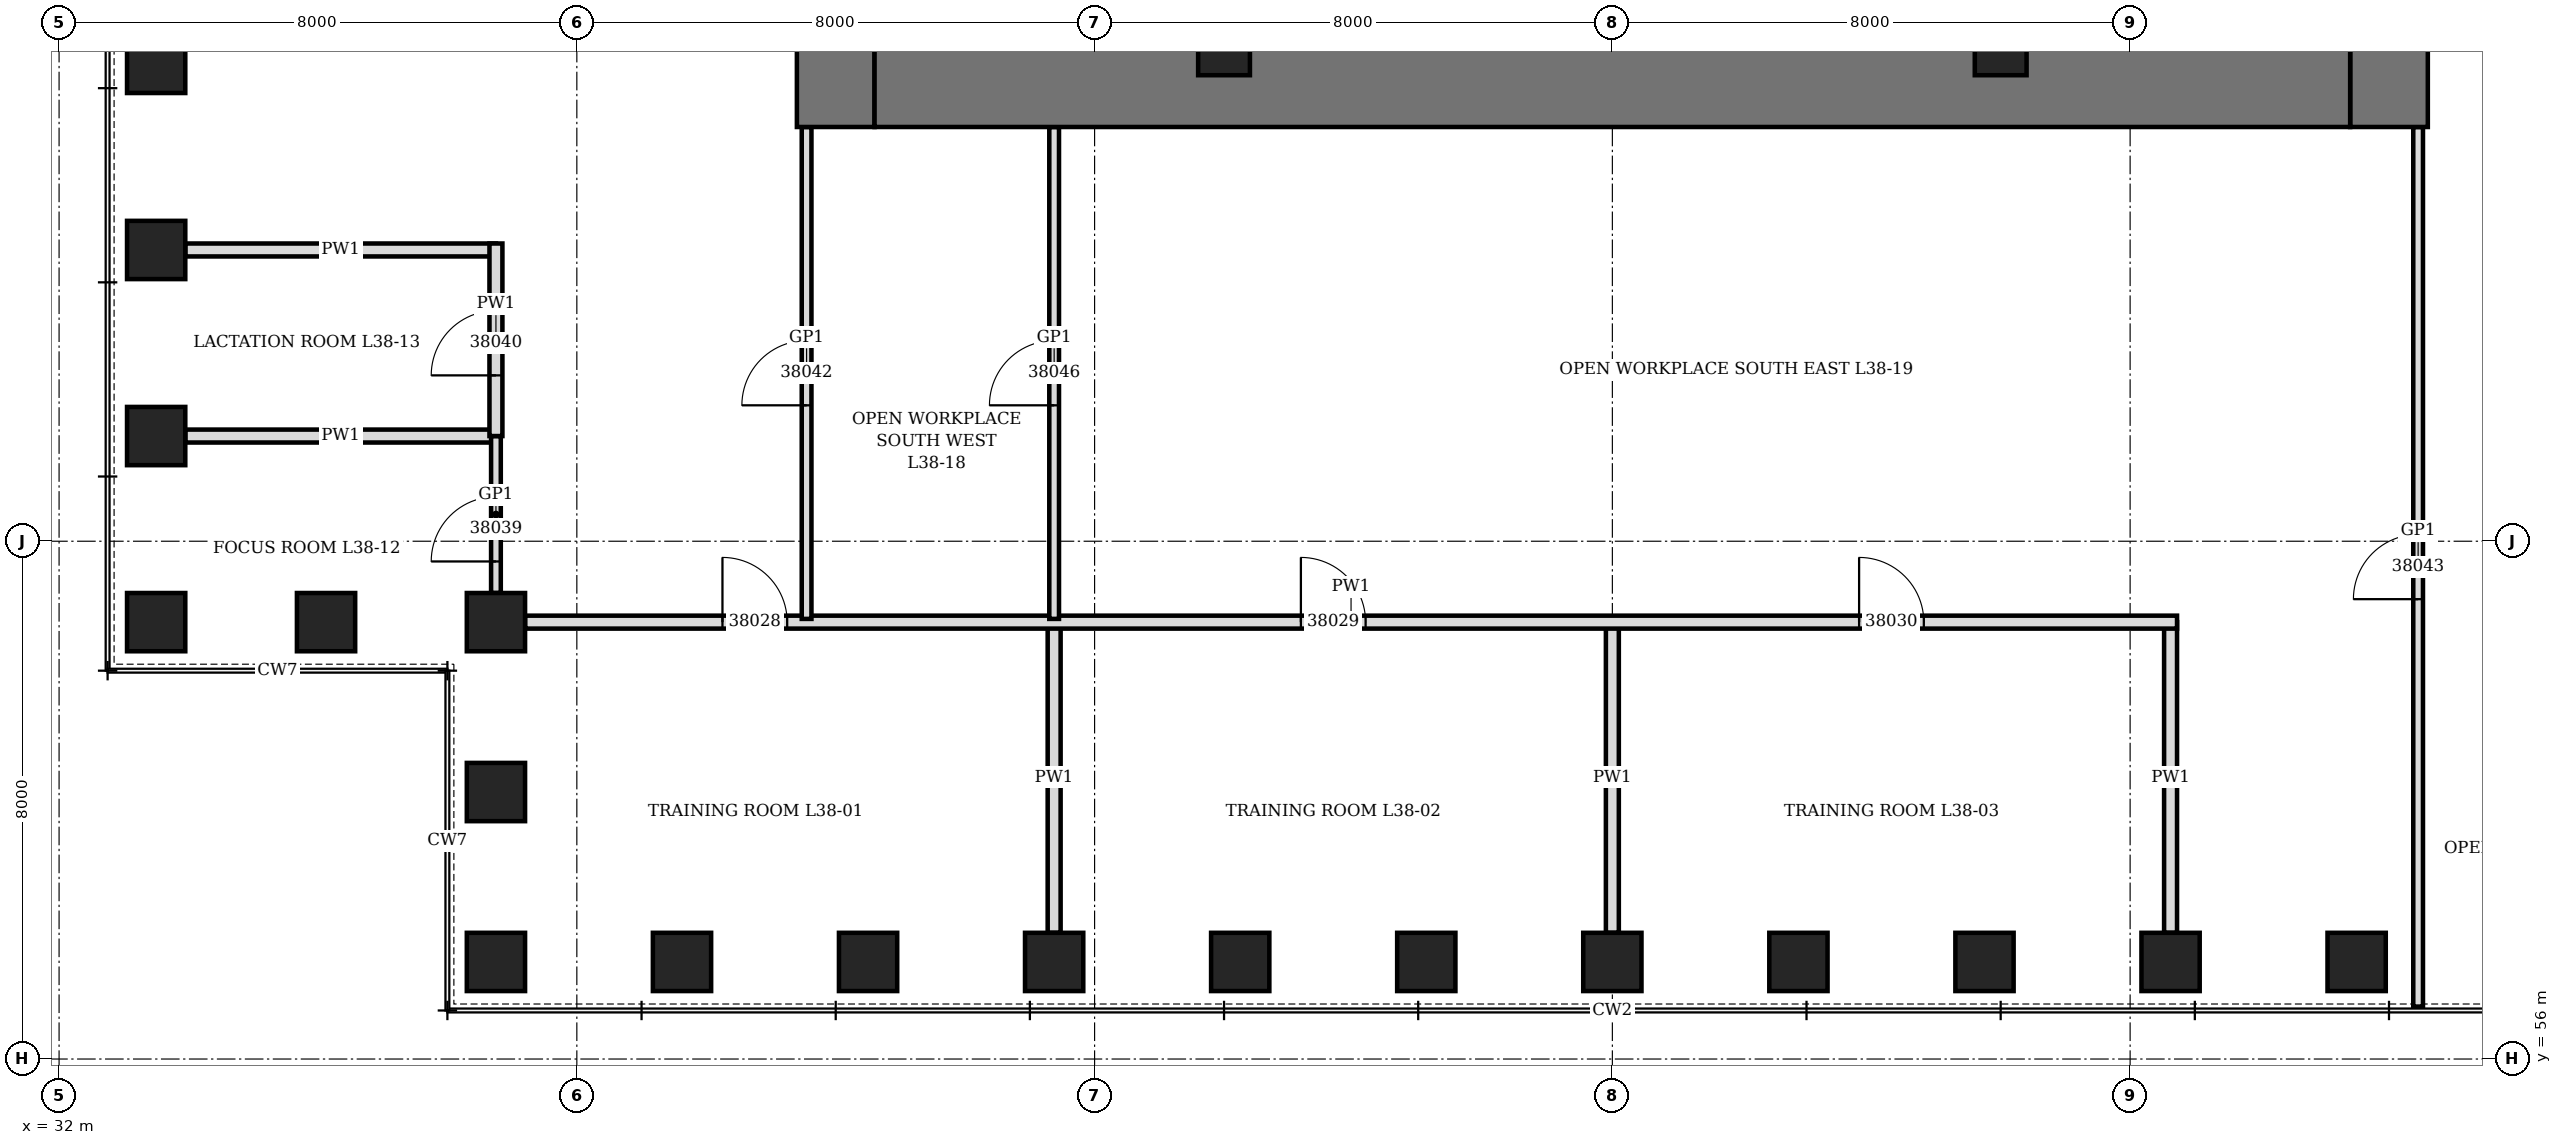
"""IFC4 building model, lengths in metres.
Left out: names, types, materials, properties, quantities, classifications, styles, units other than length and angle.
Written with IfcOpenShell. Run it as: python <this file> out.ifc"""

import sys

from ifc_helpers import new_model, si_unit, direction, frame, frame_2d, origin, origin_2d, place, context, subcontext, project, spatial, rectangle, hollow_rectangle, extrude, element, fill, save


model = new_model("IFC4")
c1 = context("Model", 3, precision=1e-05, world=origin(), true_north=direction((0.0, 1.0)))
c2 = subcontext(c1, "Body", "Model", "MODEL_VIEW")
j1 = project(units=[si_unit("LENGTHUNIT", "METRE"), si_unit("PLANEANGLEUNIT", "RADIAN")], contexts=[c1])
p1 = place(None, origin())
s1 = spatial("IfcSite", under=j1, at=p1, CompositionType="ELEMENT")
p2 = place(p1, origin())
s2 = spatial("IfcBuilding", under=s1, at=p2, CompositionType="ELEMENT")
p3 = place(p2, frame((0.0, 0.0, 171.1)))
s3 = spatial("IfcBuildingStorey", under=s2, at=p3, CompositionType="ELEMENT", Elevation=171.1)
for number, where, z_axis, x_axis in (
    (1, (38.75, 57.5, 0.0), (0.0, 0.0, 1.0), (1.0, 0.0, 0.0)),
    (2, (41.625, 57.5, 0.0), (0.0, 0.0, 1.0), (1.0, 0.0, 0.0)),
    (3, (44.5, 57.5, 0.0), (0.0, 0.0, 1.0), (1.0, 0.0, 0.0)),
    (4, (47.375, 57.5, 0.0), (0.0, 0.0, 1.0), (1.0, 0.0, 0.0)),
    (5, (50.25, 57.5, 0.0), (0.0, 0.0, 1.0), (1.0, 0.0, 0.0)),
    (6, (53.125, 57.5, 0.0), (0.0, 0.0, 1.0), (1.0, 0.0, 0.0)),
    (7, (56.0, 57.5, 0.0), (0.0, 0.0, 1.0), (1.0, 0.0, 0.0)),
    (8, (58.875, 57.5, 0.0), (0.0, 0.0, 1.0), (1.0, 0.0, 0.0)),
    (9, (61.75, 57.5, 0.0), (0.0, 0.0, 1.0), (1.0, 0.0, 0.0)),
    (10, (64.625, 57.5, 0.0), (0.0, 0.0, 1.0), (1.0, 0.0, 0.0)),
    (11, (67.5, 57.5, 0.0), (0.0, 0.0, 1.0), (1.0, 0.0, 0.0)),
    (12, (33.5, 71.375, 0.0), (0.0, 0.0, 1.0), (0.0, 1.0, 0.0)),
    (13, (33.5, 68.5, 0.0), (0.0, 0.0, 1.0), (0.0, 1.0, 0.0)),
    (14, (33.5, 65.625, 0.0), (0.0, 0.0, 1.0), (0.0, 1.0, 0.0)),
    (15, (33.5, 62.75, 0.0), (0.0, 0.0, 1.0), (1.0, 0.0, 0.0)),
    (16, (36.125, 62.75, 0.0), (0.0, 0.0, 1.0), (1.0, 0.0, 0.0)),
    (17, (38.75, 62.75, 0.0), (0.0, 0.0, 1.0), (0.0, 1.0, 0.0)),
    (18, (38.75, 60.125, 0.0), (0.0, 0.0, 1.0), (0.0, 1.0, 0.0)),
):
    element("IfcColumn", number, at=place(p3, frame(where, z_axis=z_axis, x_axis=x_axis)), inside=s3, PredefinedType="COLUMN", context=c2, shape_type="SweptSolid", body=[
        extrude(hollow_rectangle(XDim=0.9, YDim=0.9, WallThickness=0.12, at=origin_2d()), origin(), (0.0, 0.0, 1.0), 4.2),
    ])
p4 = place(p3, frame((44.0, 70.4, 0.0), z_axis=(0.0, 0.0, 1.0), x_axis=(0.0, 1.0, 0.0)))
e19 = element("IfcWall", 19, at=p4, inside=s3, PredefinedType="SHEAR", context=c2, shape_type="SweptSolid", body=[
    extrude(rectangle(XDim=19.2, YDim=1.2, at=frame_2d((9.6, 0.0))), origin(), (0.0, 0.0, 1.0), 4.2),
])
p5 = place(p4, frame((8.6, 0.0, 0.0)))
e20 = element("IfcOpeningElement", 20, at=p5, cuts=e19, PredefinedType="OPENING", context=c2, shape_type="SweptSolid", body=[
    extrude(rectangle(XDim=2.0, YDim=2.4, at=frame_2d((1.0, 1.2))), frame((0.0, 0.61, 0.0), z_axis=(0.0, -1.0, 0.0), x_axis=(1.0, 0.0, 0.0)), (0.0, 0.0, 1.0), 1.22),
])
p6 = place(p3, frame((68.0, 70.4, 0.0), z_axis=(0.0, 0.0, 1.0), x_axis=(0.0, 1.0, 0.0)))
e21 = element("IfcWall", 21, at=p6, inside=s3, PredefinedType="SHEAR", context=c2, shape_type="SweptSolid", body=[
    extrude(rectangle(XDim=19.2, YDim=1.2, at=frame_2d((9.6, 0.0))), origin(), (0.0, 0.0, 1.0), 4.2),
])
p7 = place(p6, frame((8.6, 0.0, 0.0)))
e22 = element("IfcOpeningElement", 22, at=p7, cuts=e21, PredefinedType="OPENING", context=c2, shape_type="SweptSolid", body=[
    extrude(rectangle(XDim=2.0, YDim=2.4, at=frame_2d((1.0, 1.2))), frame((0.0, 0.61, 0.0), z_axis=(0.0, -1.0, 0.0), x_axis=(1.0, 0.0, 0.0)), (0.0, 0.0, 1.0), 1.22),
])
p8 = place(p3, frame((44.6, 71.0, 0.0), z_axis=(0.0, 0.0, 1.0), x_axis=(1.0, 0.0, 0.0)))
e23 = element("IfcWall", 23, at=p8, inside=s3, PredefinedType="SHEAR", context=c2, shape_type="SweptSolid", body=[
    extrude(rectangle(XDim=22.8, YDim=1.2, at=frame_2d((11.4, 0.0))), origin(), (0.0, 0.0, 1.0), 4.2),
])
for number, where, z_axis, x_axis in (
    (24, (50.0, 71.6, 0.0), (0.0, 0.0, 1.0), (1.0, 0.0, 0.0)),
    (25, (62.0, 71.6, 0.0), (0.0, 0.0, 1.0), (1.0, 0.0, 0.0)),
):
    element("IfcColumn", number, at=place(p3, frame(where, z_axis=z_axis, x_axis=x_axis)), inside=s3, PredefinedType="COLUMN", context=c2, shape_type="SweptSolid", body=[
        extrude(hollow_rectangle(XDim=0.8, YDim=0.8, WallThickness=0.1, at=origin_2d()), origin(), (0.0, 0.0, 1.0), 4.2),
    ])
for number, where, z_axis, x_axis in (
    (26, (47.375, 57.95, 0.0), (0.0, 0.0, 1.0), (0.0, 1.0, 0.0)),
    (27, (56.0, 57.95, 0.0), (0.0, 0.0, 1.0), (0.0, 1.0, 0.0)),
    (28, (64.625, 57.95, 0.0), (0.0, 0.0, 1.0), (0.0, 1.0, 0.0)),
):
    element("IfcWall", number, at=place(p3, frame(where, z_axis=z_axis, x_axis=x_axis)), inside=s3, PredefinedType="PARTITIONING", context=c2, shape_type="SweptSolid", body=[
        extrude(rectangle(XDim=4.8, YDim=0.2, at=frame_2d((2.4, 0.0))), origin(), (0.0, 0.0, 1.0), 2.45),
    ])
for number, where, z_axis, x_axis in (
    (29, (33.95, 65.625, 0.0), (0.0, 0.0, 1.0), (1.0, 0.0, 0.0)),
    (30, (33.95, 68.5, 0.0), (0.0, 0.0, 1.0), (1.0, 0.0, 0.0)),
):
    element("IfcWall", number, at=place(p3, frame(where, z_axis=z_axis, x_axis=x_axis)), inside=s3, PredefinedType="PARTITIONING", context=c2, shape_type="SweptSolid", body=[
        extrude(rectangle(XDim=4.8, YDim=0.2, at=frame_2d((2.4, 0.0))), origin(), (0.0, 0.0, 1.0), 3.188),
    ])
p9 = place(p3, frame((39.2, 62.75, 0.0), z_axis=(0.0, 0.0, 1.0), x_axis=(1.0, 0.0, 0.0)))
e31 = element("IfcWall", 31, at=p9, inside=s3, PredefinedType="PARTITIONING", context=c2, shape_type="SweptSolid", body=[
    extrude(rectangle(XDim=25.525, YDim=0.2, at=frame_2d((12.763, 0.0))), origin(), (0.0, 0.0, 1.0), 3.95),
])
p10 = place(p9, frame((3.05, 0.0, 0.0)))
e32 = element("IfcOpeningElement", 32, at=p10, cuts=e31, PredefinedType="OPENING", context=c2, shape_type="SweptSolid", body=[
    extrude(rectangle(XDim=1.0, YDim=2.1, at=frame_2d((0.5, 1.05))), frame((0.0, 0.11, 0.0), z_axis=(0.0, -1.0, 0.0), x_axis=(1.0, 0.0, 0.0)), (0.0, 0.0, 1.0), 0.22),
])
p11 = place(p9, frame((11.988, 0.0, 0.0)))
e33 = element("IfcOpeningElement", 33, at=p11, cuts=e31, PredefinedType="OPENING", context=c2, shape_type="SweptSolid", body=[
    extrude(rectangle(XDim=1.0, YDim=2.1, at=frame_2d((0.5, 1.05))), frame((0.0, 0.11, 0.0), z_axis=(0.0, -1.0, 0.0), x_axis=(1.0, 0.0, 0.0)), (0.0, 0.0, 1.0), 0.22),
])
p12 = place(p9, frame((20.613, 0.0, 0.0)))
e34 = element("IfcOpeningElement", 34, at=p12, cuts=e31, PredefinedType="OPENING", context=c2, shape_type="SweptSolid", body=[
    extrude(rectangle(XDim=1.0, YDim=2.1, at=frame_2d((0.5, 1.05))), frame((0.0, 0.11, 0.0), z_axis=(0.0, -1.0, 0.0), x_axis=(1.0, 0.0, 0.0)), (0.0, 0.0, 1.0), 0.22),
])
p13 = place(p3, frame((38.75, 63.2, 0.0), z_axis=(0.0, 0.0, 1.0), x_axis=(0.0, 1.0, 0.0)))
e35 = element("IfcWall", 35, at=p13, inside=s3, PredefinedType="PARTITIONING", context=c2, shape_type="SweptSolid", body=[
    extrude(rectangle(XDim=2.425, YDim=0.15, at=frame_2d((1.212, 0.0))), origin(), (0.0, 0.0, 1.0), 3.95),
])
p14 = place(p13, frame((0.488, 0.0, 0.0)))
e36 = element("IfcOpeningElement", 36, at=p14, cuts=e35, PredefinedType="OPENING", context=c2, shape_type="SweptSolid", body=[
    extrude(rectangle(XDim=1.0, YDim=2.4, at=frame_2d((0.5, 1.2))), frame((0.0, 0.085, 0.0), z_axis=(0.0, -1.0, 0.0), x_axis=(1.0, 0.0, 0.0)), (0.0, 0.0, 1.0), 0.17),
])
p15 = place(p3, frame((38.75, 65.625, 0.0), z_axis=(0.0, 0.0, 1.0), x_axis=(0.0, 1.0, 0.0)))
e37 = element("IfcWall", 37, at=p15, inside=s3, PredefinedType="PARTITIONING", context=c2, shape_type="SweptSolid", body=[
    extrude(rectangle(XDim=2.975, YDim=0.2, at=frame_2d((1.488, 0.0))), origin(), (0.0, 0.0, 1.0), 3.95),
])
p16 = place(p15, frame((0.938, 0.0, 0.0)))
e38 = element("IfcOpeningElement", 38, at=p16, cuts=e37, PredefinedType="OPENING", context=c2, shape_type="SweptSolid", body=[
    extrude(rectangle(XDim=1.0, YDim=2.1, at=frame_2d((0.5, 1.05))), frame((0.0, 0.11, 0.0), z_axis=(0.0, -1.0, 0.0), x_axis=(1.0, 0.0, 0.0)), (0.0, 0.0, 1.0), 0.22),
])
p17 = place(p3, frame((43.55, 62.8, 0.0), z_axis=(0.0, 0.0, 1.0), x_axis=(0.0, 1.0, 0.0)))
e39 = element("IfcWall", 39, at=p17, inside=s3, PredefinedType="PARTITIONING", context=c2, shape_type="SweptSolid", body=[
    extrude(rectangle(XDim=7.6, YDim=0.15, at=frame_2d((3.8, 0.0))), origin(), (0.0, 0.0, 1.0), 3.95),
])
p18 = place(p17, frame((3.3, 0.0, 0.0)))
e40 = element("IfcOpeningElement", 40, at=p18, cuts=e39, PredefinedType="OPENING", context=c2, shape_type="SweptSolid", body=[
    extrude(rectangle(XDim=1.0, YDim=2.4, at=frame_2d((0.5, 1.2))), frame((0.0, 0.085, 0.0), z_axis=(0.0, -1.0, 0.0), x_axis=(1.0, 0.0, 0.0)), (0.0, 0.0, 1.0), 0.17),
])
p19 = place(p3, frame((47.375, 62.8, 0.0), z_axis=(0.0, 0.0, 1.0), x_axis=(0.0, 1.0, 0.0)))
e41 = element("IfcWall", 41, at=p19, inside=s3, PredefinedType="PARTITIONING", context=c2, shape_type="SweptSolid", body=[
    extrude(rectangle(XDim=7.6, YDim=0.15, at=frame_2d((3.8, 0.0))), origin(), (0.0, 0.0, 1.0), 2.45),
])
p20 = place(p19, frame((3.3, 0.0, 0.0)))
e42 = element("IfcOpeningElement", 42, at=p20, cuts=e41, PredefinedType="OPENING", context=c2, shape_type="SweptSolid", body=[
    extrude(rectangle(XDim=1.0, YDim=2.4, at=frame_2d((0.5, 1.2))), frame((0.0, 0.085, 0.0), z_axis=(0.0, -1.0, 0.0), x_axis=(1.0, 0.0, 0.0)), (0.0, 0.0, 1.0), 0.17),
])
p21 = place(p3, frame((68.45, 56.81, 0.0), z_axis=(0.0, 0.0, 1.0), x_axis=(0.0, 1.0, 0.0)))
e43 = element("IfcWall", 43, at=p21, inside=s3, PredefinedType="PARTITIONING", context=c2, shape_type="SweptSolid", body=[
    extrude(rectangle(XDim=13.59, YDim=0.15, at=frame_2d((6.795, 0.0))), origin(), (0.0, 0.0, 1.0), 3.95),
])
p22 = place(p21, frame((6.295, 0.0, 0.0)))
e44 = element("IfcOpeningElement", 44, at=p22, cuts=e43, PredefinedType="OPENING", context=c2, shape_type="SweptSolid", body=[
    extrude(rectangle(XDim=1.0, YDim=2.4, at=frame_2d((0.5, 1.2))), frame((0.0, 0.085, 0.0), z_axis=(0.0, -1.0, 0.0), x_axis=(1.0, 0.0, 0.0)), (0.0, 0.0, 1.0), 0.17),
])
p23 = place(p10, origin())
e45 = element("IfcDoor", 45, at=p23, inside=s3, OperationType="SINGLE_SWING_LEFT", PredefinedType="DOOR", context=c2, shape_type="SweptSolid", body=[
    extrude(rectangle(XDim=1.0, YDim=2.1, at=frame_2d((0.5, 1.05))), frame((0.0, 0.1, 0.0), z_axis=(0.0, -1.0, 0.0), x_axis=(1.0, 0.0, 0.0)), (0.0, 0.0, 1.0), 0.199),
])
fill(e32, e45)
p24 = place(p11, origin())
e46 = element("IfcDoor", 46, at=p24, inside=s3, OperationType="SINGLE_SWING_LEFT", PredefinedType="DOOR", context=c2, shape_type="SweptSolid", body=[
    extrude(rectangle(XDim=1.0, YDim=2.1, at=frame_2d((0.5, 1.05))), frame((0.0, 0.1, 0.0), z_axis=(0.0, -1.0, 0.0), x_axis=(1.0, 0.0, 0.0)), (0.0, 0.0, 1.0), 0.199),
])
fill(e33, e46)
p25 = place(p12, origin())
e47 = element("IfcDoor", 47, at=p25, inside=s3, OperationType="SINGLE_SWING_LEFT", PredefinedType="DOOR", context=c2, shape_type="SweptSolid", body=[
    extrude(rectangle(XDim=1.0, YDim=2.1, at=frame_2d((0.5, 1.05))), frame((0.0, 0.1, 0.0), z_axis=(0.0, -1.0, 0.0), x_axis=(1.0, 0.0, 0.0)), (0.0, 0.0, 1.0), 0.199),
])
fill(e34, e47)
p26 = place(p14, origin())
e48 = element("IfcDoor", 48, at=p26, inside=s3, OperationType="SINGLE_SWING_RIGHT", PredefinedType="DOOR", context=c2, shape_type="SweptSolid", body=[
    extrude(rectangle(XDim=1.0, YDim=2.4, at=frame_2d((0.5, 1.2))), frame((0.0, 0.075, 0.0), z_axis=(0.0, -1.0, 0.0), x_axis=(1.0, 0.0, 0.0)), (0.0, 0.0, 1.0), 0.149),
])
fill(e36, e48)
p27 = place(p16, origin())
e49 = element("IfcDoor", 49, at=p27, inside=s3, OperationType="SINGLE_SWING_LEFT", PredefinedType="DOOR", context=c2, shape_type="SweptSolid", body=[
    extrude(rectangle(XDim=1.0, YDim=2.1, at=frame_2d((0.5, 1.05))), frame((0.0, 0.1, 0.0), z_axis=(0.0, -1.0, 0.0), x_axis=(1.0, 0.0, 0.0)), (0.0, 0.0, 1.0), 0.199),
])
fill(e38, e49)
p28 = place(p18, origin())
e50 = element("IfcDoor", 50, at=p28, inside=s3, OperationType="SINGLE_SWING_RIGHT", PredefinedType="DOOR", context=c2, shape_type="SweptSolid", body=[
    extrude(rectangle(XDim=1.0, YDim=2.4, at=frame_2d((0.5, 1.2))), frame((0.0, 0.075, 0.0), z_axis=(0.0, -1.0, 0.0), x_axis=(1.0, 0.0, 0.0)), (0.0, 0.0, 1.0), 0.149),
])
fill(e40, e50)
p29 = place(p22, origin())
e51 = element("IfcDoor", 51, at=p29, inside=s3, OperationType="SINGLE_SWING_RIGHT", PredefinedType="DOOR", context=c2, shape_type="SweptSolid", body=[
    extrude(rectangle(XDim=1.0, YDim=2.4, at=frame_2d((0.5, 1.2))), frame((0.0, 0.075, 0.0), z_axis=(0.0, -1.0, 0.0), x_axis=(1.0, 0.0, 0.0)), (0.0, 0.0, 1.0), 0.149),
])
fill(e44, e51)
p30 = place(p20, origin())
e52 = element("IfcDoor", 52, at=p30, inside=s3, OperationType="SINGLE_SWING_RIGHT", PredefinedType="DOOR", context=c2, shape_type="SweptSolid", body=[
    extrude(rectangle(XDim=1.0, YDim=2.4, at=frame_2d((0.5, 1.2))), frame((0.0, 0.075, 0.0), z_axis=(0.0, -1.0, 0.0), x_axis=(1.0, 0.0, 0.0)), (0.0, 0.0, 1.0), 0.149),
])
fill(e42, e52)
save(model, sys.argv[1])
